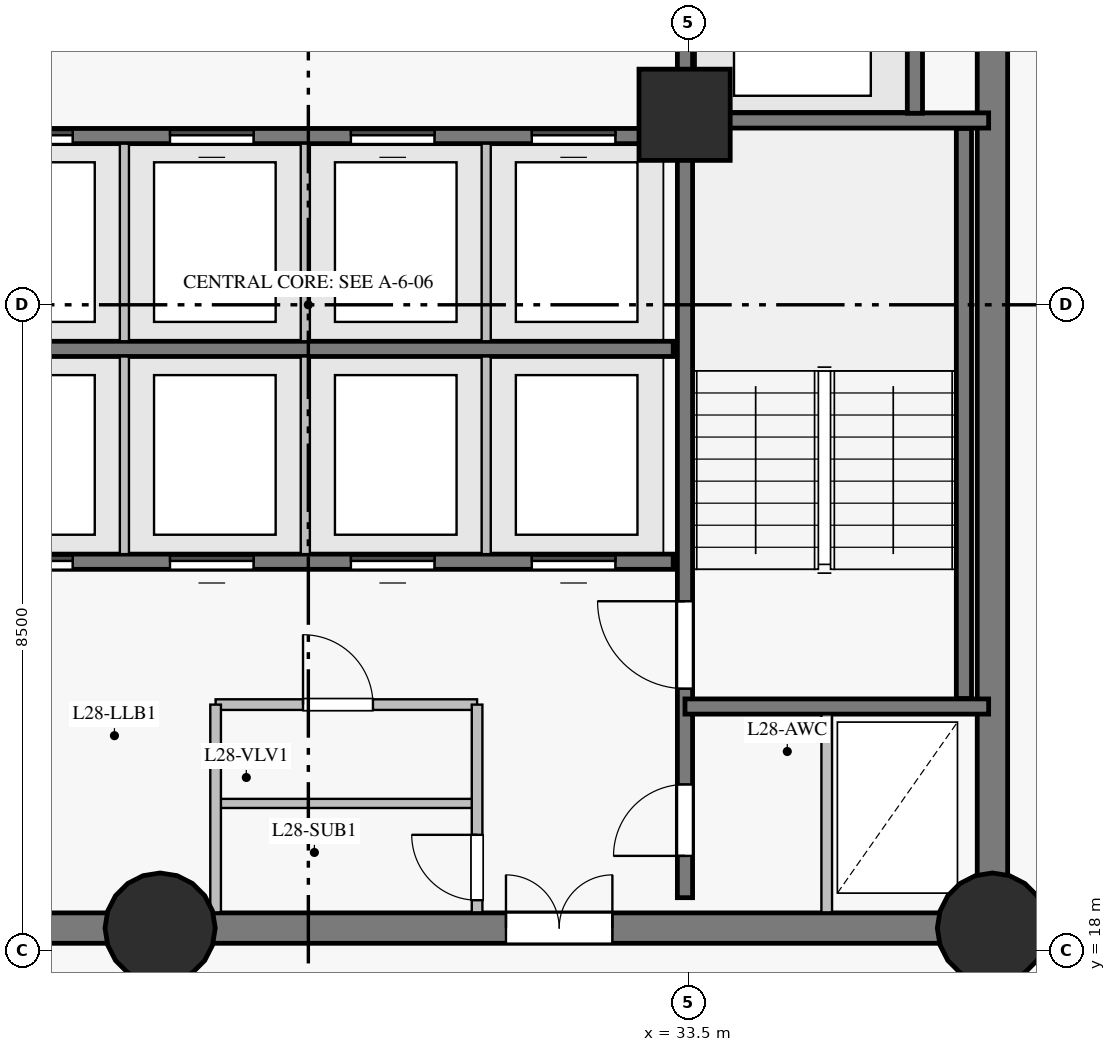
"""IFC4 building model, lengths in metres.
Left out: names, types, materials, properties, quantities, classifications, styles, units other than length and angle.
Written with IfcOpenShell. Run it as: python <this file> out.ifc"""

import sys

from ifc_helpers import new_model, si_unit, direction, frame, frame_2d, origin, origin_with_axes, origin_2d, place, context, subcontext, project, spatial, rectangle, circle, extrude, source, transform, mapped, element, fill, save


model = new_model("IFC4")
c1 = context("Model", 3, precision=1e-05, world=origin(), true_north=direction((0.0, 1.0)))
c2 = subcontext(c1, "Body", "Model", "MODEL_VIEW")
j1 = project(units=[si_unit("LENGTHUNIT", "METRE"), si_unit("PLANEANGLEUNIT", "RADIAN")], contexts=[c1])
p1 = place(None, origin())
s1 = spatial("IfcSite", under=j1, at=p1, CompositionType="ELEMENT")
p2 = place(p1, origin())
s2 = spatial("IfcBuilding", under=s1, at=p2, CompositionType="ELEMENT")
p3 = place(p2, frame((0.0, 0.0, 105.35)))
s3 = spatial("IfcBuildingStorey", under=s2, at=p3, CompositionType="ELEMENT", Elevation=105.35)
p4 = place(p3, frame((19.5, 18.3, 0.0), z_axis=(0.0, 0.0, 1.0), x_axis=(1.0, 0.0, 0.0)))
e1 = element("IfcWall", 1, at=p4, inside=s3, PredefinedType="SHEAR", context=c2, shape_type="SweptSolid", body=[
    extrude(rectangle(XDim=7.05, YDim=0.4, at=frame_2d((3.525, 0.0))), origin(), (0.0, 0.0, 1.0), 2.825),
])
p5 = place(p4, frame((4.2, 0.0, 0.0)))
e2 = element("IfcOpeningElement", 2, at=p5, cuts=e1, PredefinedType="OPENING", context=c2, shape_type="SweptSolid", body=[
    extrude(rectangle(XDim=1.4, YDim=2.2, at=frame_2d((0.7, 1.1))), frame((0.0, 0.21, 0.0), z_axis=(0.0, -1.0, 0.0), x_axis=(1.0, 0.0, 0.0)), (0.0, 0.0, 1.0), 0.42),
])
p6 = place(p3, frame((26.55, 18.3, 0.0), z_axis=(0.0, 0.0, 1.0), x_axis=(1.0, 0.0, 0.0)))
e3 = element("IfcWall", 3, at=p6, inside=s3, PredefinedType="SHEAR", context=c2, shape_type="SweptSolid", body=[
    extrude(rectangle(XDim=10.95, YDim=0.4, at=frame_2d((5.475, 0.0))), origin(), (0.0, 0.0, 1.0), 2.825),
])
p7 = place(p6, frame((4.55, 0.0, 0.0)))
e4 = element("IfcOpeningElement", 4, at=p7, cuts=e3, PredefinedType="OPENING", context=c2, shape_type="SweptSolid", body=[
    extrude(rectangle(XDim=1.4, YDim=2.2, at=frame_2d((0.7, 1.1))), frame((0.0, 0.21, 0.0), z_axis=(0.0, -1.0, 0.0), x_axis=(1.0, 0.0, 0.0)), (0.0, 0.0, 1.0), 0.42),
])
p8 = place(p3, frame((37.5, 18.3, 0.0), z_axis=(0.0, 0.0, 1.0), x_axis=(0.0, 1.0, 0.0)))
e5 = element("IfcWall", 5, at=p8, inside=s3, PredefinedType="SHEAR", context=c2, shape_type="SweptSolid", body=[
    extrude(rectangle(XDim=16.4, YDim=0.4, at=frame_2d((8.2, 0.0))), origin(), (0.0, 0.0, 1.0), 2.825),
])
p9 = place(p8, frame((14.15, 0.0, 0.0)))
e6 = element("IfcOpeningElement", 6, at=p9, cuts=e5, PredefinedType="OPENING", context=c2, shape_type="SweptSolid", body=[
    extrude(rectangle(XDim=1.2, YDim=2.15, at=frame_2d((0.6, 1.075))), frame((0.0, 0.21, 0.0), z_axis=(0.0, -1.0, 0.0), x_axis=(1.0, 0.0, 0.0)), (0.0, 0.0, 1.0), 0.42),
])
m1 = source(origin_with_axes(), c2, "Body", "SweptSolid", [
    extrude(circle(Radius=0.725, at=origin_2d()), origin(), (0.0, 0.0, 1.0), 3.05),
])
for number, where, z_axis, x_axis in (
    (7, (26.55, 18.3, 0.0), (0.0, 0.0, 1.0), (1.0, 0.0, 0.0)),
    (8, (37.5, 18.3, 0.0), (0.0, 0.0, 1.0), (1.0, 0.0, 0.0)),
):
    element("IfcColumn", number, at=place(p3, frame(where, z_axis=z_axis, x_axis=x_axis)), inside=s3, PredefinedType="COLUMN", context=c2, shape_type="MappedRepresentation", body=[
        mapped(m1, transform((0.0, 0.0, 0.0), scale=1.0)),
    ])
m2 = source(origin_with_axes(), c2, "Body", "SweptSolid", [
    extrude(rectangle(XDim=1.2, YDim=1.2, at=origin_2d()), origin(), (0.0, 0.0, 1.0), 3.05),
])
p10 = place(p3, frame((33.45, 29.0, 0.0), z_axis=(0.0, 0.0, 1.0), x_axis=(1.0, 0.0, 0.0)))
e9 = element("IfcColumn", 9, at=p10, inside=s3, PredefinedType="COLUMN", context=c2, shape_type="MappedRepresentation", body=[
    mapped(m2, transform((0.0, 0.0, 0.0), scale=1.0)),
])
p11 = place(p3, frame((33.455, 18.7, 0.0), z_axis=(0.0, 0.0, 1.0), x_axis=(0.0, 1.0, 0.0)))
e10 = element("IfcWall", 10, at=p11, inside=s3, PredefinedType="SHEAR", context=c2, shape_type="SweptSolid", body=[
    extrude(rectangle(XDim=15.6, YDim=0.2, at=frame_2d((7.8, 0.0))), origin(), (0.0, 0.0, 1.0), 2.825),
])
p12 = place(p11, frame((2.75, 0.0, 0.0)))
e11 = element("IfcOpeningElement", 11, at=p12, cuts=e10, PredefinedType="OPENING", context=c2, shape_type="SweptSolid", body=[
    extrude(rectangle(XDim=1.15, YDim=2.15, at=frame_2d((0.575, 1.075))), frame((0.0, 0.11, 0.0), z_axis=(0.0, -1.0, 0.0), x_axis=(1.0, 0.0, 0.0)), (0.0, 0.0, 1.0), 0.22),
])
p13 = place(p11, frame((0.55, 0.0, 0.0)))
e12 = element("IfcOpeningElement", 12, at=p13, cuts=e10, PredefinedType="OPENING", context=c2, shape_type="SweptSolid", body=[
    extrude(rectangle(XDim=0.94, YDim=2.1, at=frame_2d((0.47, 1.05))), frame((0.0, 0.11, 0.0), z_axis=(0.0, -1.0, 0.0), x_axis=(1.0, 0.0, 0.0)), (0.0, 0.0, 1.0), 0.22),
])
p14 = place(p3, frame((23.7, 23.12, 0.0), z_axis=(0.0, 0.0, 1.0), x_axis=(1.0, 0.0, 0.0)))
e13 = element("IfcWall", 13, at=p14, inside=s3, PredefinedType="SHEAR", context=c2, shape_type="SweptSolid", body=[
    extrude(rectangle(XDim=9.6, YDim=0.2, at=frame_2d((4.8, 0.0))), origin(), (0.0, 0.0, 1.0), 2.825),
])
p15 = place(p14, frame((0.6, 0.0, 0.0)))
e14 = element("IfcOpeningElement", 14, at=p15, cuts=e13, PredefinedType="OPENING", context=c2, shape_type="SweptSolid", body=[
    extrude(rectangle(XDim=1.1, YDim=2.15, at=frame_2d((0.55, 1.075))), frame((0.0, 0.11, 0.0), z_axis=(0.0, -1.0, 0.0), x_axis=(1.0, 0.0, 0.0)), (0.0, 0.0, 1.0), 0.22),
])
p16 = place(p14, frame((2.98, 0.0, 0.0)))
e15 = element("IfcOpeningElement", 15, at=p16, cuts=e13, PredefinedType="OPENING", context=c2, shape_type="SweptSolid", body=[
    extrude(rectangle(XDim=1.1, YDim=2.15, at=frame_2d((0.55, 1.075))), frame((0.0, 0.11, 0.0), z_axis=(0.0, -1.0, 0.0), x_axis=(1.0, 0.0, 0.0)), (0.0, 0.0, 1.0), 0.22),
])
p17 = place(p14, frame((5.36, 0.0, 0.0)))
e16 = element("IfcOpeningElement", 16, at=p17, cuts=e13, PredefinedType="OPENING", context=c2, shape_type="SweptSolid", body=[
    extrude(rectangle(XDim=1.1, YDim=2.15, at=frame_2d((0.55, 1.075))), frame((0.0, 0.11, 0.0), z_axis=(0.0, -1.0, 0.0), x_axis=(1.0, 0.0, 0.0)), (0.0, 0.0, 1.0), 0.22),
])
p18 = place(p14, frame((7.74, 0.0, 0.0)))
e17 = element("IfcOpeningElement", 17, at=p18, cuts=e13, PredefinedType="OPENING", context=c2, shape_type="SweptSolid", body=[
    extrude(rectangle(XDim=1.1, YDim=2.15, at=frame_2d((0.55, 1.075))), frame((0.0, 0.11, 0.0), z_axis=(0.0, -1.0, 0.0), x_axis=(1.0, 0.0, 0.0)), (0.0, 0.0, 1.0), 0.22),
])
p19 = place(p3, frame((23.7, 25.92, 0.0), z_axis=(0.0, 0.0, 1.0), x_axis=(1.0, 0.0, 0.0)))
e18 = element("IfcWall", 18, at=p19, inside=s3, PredefinedType="SHEAR", context=c2, shape_type="SweptSolid", body=[
    extrude(rectangle(XDim=9.6, YDim=0.2, at=frame_2d((4.8, 0.0))), origin(), (0.0, 0.0, 1.0), 2.825),
])
p20 = place(p3, frame((23.7, 28.72, 0.0), z_axis=(0.0, 0.0, 1.0), x_axis=(1.0, 0.0, 0.0)))
e19 = element("IfcWall", 19, at=p20, inside=s3, PredefinedType="SHEAR", context=c2, shape_type="SweptSolid", body=[
    extrude(rectangle(XDim=9.6, YDim=0.2, at=frame_2d((4.8, 0.0))), origin(), (0.0, 0.0, 1.0), 2.825),
])
p21 = place(p20, frame((0.6, 0.0, 0.0)))
e20 = element("IfcOpeningElement", 20, at=p21, cuts=e19, PredefinedType="OPENING", context=c2, shape_type="SweptSolid", body=[
    extrude(rectangle(XDim=1.1, YDim=2.15, at=frame_2d((0.55, 1.075))), frame((0.0, 0.11, 0.0), z_axis=(0.0, -1.0, 0.0), x_axis=(1.0, 0.0, 0.0)), (0.0, 0.0, 1.0), 0.22),
])
p22 = place(p20, frame((2.98, 0.0, 0.0)))
e21 = element("IfcOpeningElement", 21, at=p22, cuts=e19, PredefinedType="OPENING", context=c2, shape_type="SweptSolid", body=[
    extrude(rectangle(XDim=1.1, YDim=2.15, at=frame_2d((0.55, 1.075))), frame((0.0, 0.11, 0.0), z_axis=(0.0, -1.0, 0.0), x_axis=(1.0, 0.0, 0.0)), (0.0, 0.0, 1.0), 0.22),
])
p23 = place(p20, frame((5.36, 0.0, 0.0)))
e22 = element("IfcOpeningElement", 22, at=p23, cuts=e19, PredefinedType="OPENING", context=c2, shape_type="SweptSolid", body=[
    extrude(rectangle(XDim=1.1, YDim=2.15, at=frame_2d((0.55, 1.075))), frame((0.0, 0.11, 0.0), z_axis=(0.0, -1.0, 0.0), x_axis=(1.0, 0.0, 0.0)), (0.0, 0.0, 1.0), 0.22),
])
p24 = place(p20, frame((7.74, 0.0, 0.0)))
e23 = element("IfcOpeningElement", 23, at=p24, cuts=e19, PredefinedType="OPENING", context=c2, shape_type="SweptSolid", body=[
    extrude(rectangle(XDim=1.1, YDim=2.15, at=frame_2d((0.55, 1.075))), frame((0.0, 0.11, 0.0), z_axis=(0.0, -1.0, 0.0), x_axis=(1.0, 0.0, 0.0)), (0.0, 0.0, 1.0), 0.22),
])
p25 = place(p3, frame((37.125, 21.32, 0.0), z_axis=(0.0, 0.0, 1.0), x_axis=(0.0, 1.0, 0.0)))
e24 = element("IfcWall", 24, at=p25, inside=s3, PredefinedType="SHEAR", context=c2, shape_type="SweptSolid", body=[
    extrude(rectangle(XDim=7.5, YDim=0.2, at=frame_2d((3.75, 0.0))), origin(), (0.0, 0.0, 1.0), 2.825),
])
for number, where, z_axis, x_axis in (
    (25, (33.455, 21.215, 0.0), (0.0, 0.0, 1.0), (1.0, 0.0, 0.0)),
    (26, (33.455, 28.925, 0.0), (0.0, 0.0, 1.0), (1.0, 0.0, 0.0)),
):
    element("IfcWall", number, at=place(p3, frame(where, z_axis=z_axis, x_axis=x_axis)), inside=s3, PredefinedType="SHEAR", context=c2, shape_type="SweptSolid", body=[
        extrude(rectangle(XDim=3.995, YDim=0.2, at=frame_2d((1.998, 0.0))), origin(), (0.0, 0.0, 1.0), 2.825),
    ])
p26 = place(p3, frame((36.48, 29.02, 0.0), z_axis=(0.0, 0.0, 1.0), x_axis=(0.0, 1.0, 0.0)))
e27 = element("IfcWall", 27, at=p26, inside=s3, PredefinedType="SHEAR", context=c2, shape_type="SweptSolid", body=[
    extrude(rectangle(XDim=2.86, YDim=0.2, at=frame_2d((1.43, 0.0))), origin(), (0.0, 0.0, 1.0), 2.825),
])
p27 = place(p3, frame((27.28, 21.24, 0.0), z_axis=(0.0, 0.0, 1.0), x_axis=(1.0, 0.0, 0.0)))
e28 = element("IfcWall", 28, at=p27, inside=s3, PredefinedType="PARTITIONING", context=c2, shape_type="SweptSolid", body=[
    extrude(rectangle(XDim=3.44, YDim=0.14, at=frame_2d((1.72, 0.0))), origin(), (0.0, 0.0, 1.0), 2.825),
])
p28 = place(p27, frame((1.15, 0.0, 0.0)))
e29 = element("IfcOpeningElement", 29, at=p28, cuts=e28, PredefinedType="OPENING", context=c2, shape_type="SweptSolid", body=[
    extrude(rectangle(XDim=0.92, YDim=2.1, at=frame_2d((0.46, 1.05))), frame((0.0, 0.08, 0.0), z_axis=(0.0, -1.0, 0.0), x_axis=(1.0, 0.0, 0.0)), (0.0, 0.0, 1.0), 0.16),
])
p29 = place(p3, frame((27.28, 19.94, 0.0), z_axis=(0.0, 0.0, 1.0), x_axis=(1.0, 0.0, 0.0)))
e30 = element("IfcWall", 30, at=p29, inside=s3, PredefinedType="PARTITIONING", context=c2, shape_type="SweptSolid", body=[
    extrude(rectangle(XDim=3.44, YDim=0.12, at=frame_2d((1.72, 0.0))), origin(), (0.0, 0.0, 1.0), 2.825),
])
p30 = place(p3, frame((27.28, 18.507, 0.0), z_axis=(0.0, 0.0, 1.0), x_axis=(0.0, 1.0, 0.0)))
e31 = element("IfcWall", 31, at=p30, inside=s3, PredefinedType="PARTITIONING", context=c2, shape_type="SweptSolid", body=[
    extrude(rectangle(XDim=2.733, YDim=0.14, at=frame_2d((1.366, 0.0))), origin(), (0.0, 0.0, 1.0), 2.825),
])
p31 = place(p3, frame((30.72, 18.507, 0.0), z_axis=(0.0, 0.0, 1.0), x_axis=(0.0, 1.0, 0.0)))
e32 = element("IfcWall", 32, at=p31, inside=s3, PredefinedType="PARTITIONING", context=c2, shape_type="SweptSolid", body=[
    extrude(rectangle(XDim=2.733, YDim=0.14, at=frame_2d((1.366, 0.0))), origin(), (0.0, 0.0, 1.0), 2.825),
])
p32 = place(p31, frame((0.16, 0.0, 0.0)))
e33 = element("IfcOpeningElement", 33, at=p32, cuts=e32, PredefinedType="OPENING", context=c2, shape_type="SweptSolid", body=[
    extrude(rectangle(XDim=0.86, YDim=2.1, at=frame_2d((0.43, 1.05))), frame((0.0, 0.08, 0.0), z_axis=(0.0, -1.0, 0.0), x_axis=(1.0, 0.0, 0.0)), (0.0, 0.0, 1.0), 0.16),
])
for number, where, z_axis, x_axis in (
    (34, (26.08, 23.22, 0.0), (0.0, 0.0, 1.0), (0.0, 1.0, 0.0)),
    (35, (28.46, 23.22, 0.0), (0.0, 0.0, 1.0), (0.0, 1.0, 0.0)),
    (36, (30.84, 23.22, 0.0), (0.0, 0.0, 1.0), (0.0, 1.0, 0.0)),
    (37, (26.08, 26.02, 0.0), (0.0, 0.0, 1.0), (0.0, 1.0, 0.0)),
    (38, (28.46, 26.02, 0.0), (0.0, 0.0, 1.0), (0.0, 1.0, 0.0)),
    (39, (30.84, 26.02, 0.0), (0.0, 0.0, 1.0), (0.0, 1.0, 0.0)),
):
    element("IfcWall", number, at=place(p3, frame(where, z_axis=z_axis, x_axis=x_axis)), inside=s3, PredefinedType="PARTITIONING", context=c2, shape_type="SweptSolid", body=[
        extrude(rectangle(XDim=2.6, YDim=0.12, at=frame_2d((1.3, 0.0))), origin(), (0.0, 0.0, 1.0), 2.825),
    ])
p33 = place(p3, frame((35.32, 18.507, 0.0), z_axis=(0.0, 0.0, 1.0), x_axis=(0.0, 1.0, 0.0)))
e40 = element("IfcWall", 40, at=p33, inside=s3, PredefinedType="PARTITIONING", context=c2, shape_type="SweptSolid", body=[
    extrude(rectangle(XDim=2.604, YDim=0.14, at=frame_2d((1.302, 0.0))), origin(), (0.0, 0.0, 1.0), 2.825),
])
m3 = source(origin_with_axes(), c2, "Body", "SweptSolid", [
    extrude(rectangle(XDim=1.15, YDim=2.15, at=frame_2d((0.575, 1.075))), frame((0.0, 0.025, 0.0), z_axis=(0.0, -1.0, 0.0), x_axis=(1.0, 0.0, 0.0)), (0.0, 0.0, 1.0), 0.05),
])
p34 = place(p12, origin())
e41 = element("IfcDoor", 41, at=p34, inside=s3, OperationType="SINGLE_SWING_RIGHT", PredefinedType="DOOR", context=c2, shape_type="MappedRepresentation", body=[
    mapped(m3, transform((0.0, 0.0, 0.0), scale=1.0)),
])
fill(e11, e41)
m4 = source(origin_with_axes(), c2, "Body", "SweptSolid", [
    extrude(rectangle(XDim=1.4, YDim=2.2, at=frame_2d((0.7, 1.1))), frame((0.0, 0.025, 0.0), z_axis=(0.0, -1.0, 0.0), x_axis=(1.0, 0.0, 0.0)), (0.0, 0.0, 1.0), 0.05),
])
p35 = place(p7, origin())
e42 = element("IfcDoor", 42, at=p35, inside=s3, OperationType="DOUBLE_DOOR_SINGLE_SWING", PredefinedType="DOOR", context=c2, shape_type="MappedRepresentation", body=[
    mapped(m4, transform((0.0, 0.0, 0.0), scale=1.0)),
])
fill(e4, e42)
m5 = source(origin_with_axes(), c2, "Body", "SweptSolid", [
    extrude(rectangle(XDim=0.94, YDim=2.1, at=frame_2d((0.47, 1.05))), frame((0.0, 0.025, 0.0), z_axis=(0.0, -1.0, 0.0), x_axis=(1.0, 0.0, 0.0)), (0.0, 0.0, 1.0), 0.05),
])
p36 = place(p13, origin())
e43 = element("IfcDoor", 43, at=p36, inside=s3, OperationType="SINGLE_SWING_LEFT", PredefinedType="DOOR", context=c2, shape_type="MappedRepresentation", body=[
    mapped(m5, transform((0.0, 0.0, 0.0), scale=1.0)),
])
fill(e12, e43)
m6 = source(origin_with_axes(), c2, "Body", "SweptSolid", [
    extrude(rectangle(XDim=0.86, YDim=2.1, at=frame_2d((0.43, 1.05))), frame((0.0, 0.025, 0.0), z_axis=(0.0, -1.0, 0.0), x_axis=(1.0, 0.0, 0.0)), (0.0, 0.0, 1.0), 0.05),
])
p37 = place(p32, origin())
e44 = element("IfcDoor", 44, at=p37, inside=s3, OperationType="SINGLE_SWING_RIGHT", PredefinedType="DOOR", context=c2, shape_type="MappedRepresentation", body=[
    mapped(m6, transform((0.0, 0.0, 0.0), scale=1.0)),
])
fill(e33, e44)
m7 = source(origin_with_axes(), c2, "Body", "SweptSolid", [
    extrude(rectangle(XDim=0.92, YDim=2.1, at=frame_2d((0.46, 1.05))), frame((0.0, 0.025, 0.0), z_axis=(0.0, -1.0, 0.0), x_axis=(1.0, 0.0, 0.0)), (0.0, 0.0, 1.0), 0.05),
])
p38 = place(p28, origin())
e45 = element("IfcDoor", 45, at=p38, inside=s3, OperationType="SINGLE_SWING_LEFT", PredefinedType="DOOR", context=c2, shape_type="MappedRepresentation", body=[
    mapped(m7, transform((0.0, 0.0, 0.0), scale=1.0)),
])
fill(e29, e45)
m8 = source(origin_with_axes(), c2, "Body", "SweptSolid", [
    extrude(rectangle(XDim=1.1, YDim=2.15, at=frame_2d((0.55, 1.075))), frame((0.0, 0.025, 0.0), z_axis=(0.0, -1.0, 0.0), x_axis=(1.0, 0.0, 0.0)), (0.0, 0.0, 1.0), 0.05),
])
p39 = place(p15, origin())
e46 = element("IfcDoor", 46, at=p39, inside=s3, OperationType="SLIDING_TO_LEFT", PredefinedType="DOOR", context=c2, shape_type="MappedRepresentation", body=[
    mapped(m8, transform((0.0, 0.0, 0.0), scale=1.0)),
])
fill(e14, e46)
p40 = place(p16, origin())
e47 = element("IfcDoor", 47, at=p40, inside=s3, OperationType="SLIDING_TO_RIGHT", PredefinedType="DOOR", context=c2, shape_type="MappedRepresentation", body=[
    mapped(m8, transform((0.0, 0.0, 0.0), scale=1.0)),
])
fill(e15, e47)
p41 = place(p17, origin())
e48 = element("IfcDoor", 48, at=p41, inside=s3, OperationType="SLIDING_TO_LEFT", PredefinedType="DOOR", context=c2, shape_type="MappedRepresentation", body=[
    mapped(m8, transform((0.0, 0.0, 0.0), scale=1.0)),
])
fill(e16, e48)
p42 = place(p18, origin())
e49 = element("IfcDoor", 49, at=p42, inside=s3, OperationType="SLIDING_TO_RIGHT", PredefinedType="DOOR", context=c2, shape_type="MappedRepresentation", body=[
    mapped(m8, transform((0.0, 0.0, 0.0), scale=1.0)),
])
fill(e17, e49)
p43 = place(p21, origin())
e50 = element("IfcDoor", 50, at=p43, inside=s3, OperationType="SLIDING_TO_LEFT", PredefinedType="DOOR", context=c2, shape_type="MappedRepresentation", body=[
    mapped(m8, transform((0.0, 0.0, 0.0), scale=1.0)),
])
fill(e20, e50)
p44 = place(p22, origin())
e51 = element("IfcDoor", 51, at=p44, inside=s3, OperationType="SLIDING_TO_RIGHT", PredefinedType="DOOR", context=c2, shape_type="MappedRepresentation", body=[
    mapped(m8, transform((0.0, 0.0, 0.0), scale=1.0)),
])
fill(e21, e51)
p45 = place(p23, origin())
e52 = element("IfcDoor", 52, at=p45, inside=s3, OperationType="SLIDING_TO_LEFT", PredefinedType="DOOR", context=c2, shape_type="MappedRepresentation", body=[
    mapped(m8, transform((0.0, 0.0, 0.0), scale=1.0)),
])
fill(e22, e52)
p46 = place(p24, origin())
e53 = element("IfcDoor", 53, at=p46, inside=s3, OperationType="SLIDING_TO_RIGHT", PredefinedType="DOOR", context=c2, shape_type="MappedRepresentation", body=[
    mapped(m8, transform((0.0, 0.0, 0.0), scale=1.0)),
])
fill(e23, e53)
save(model, sys.argv[1])
